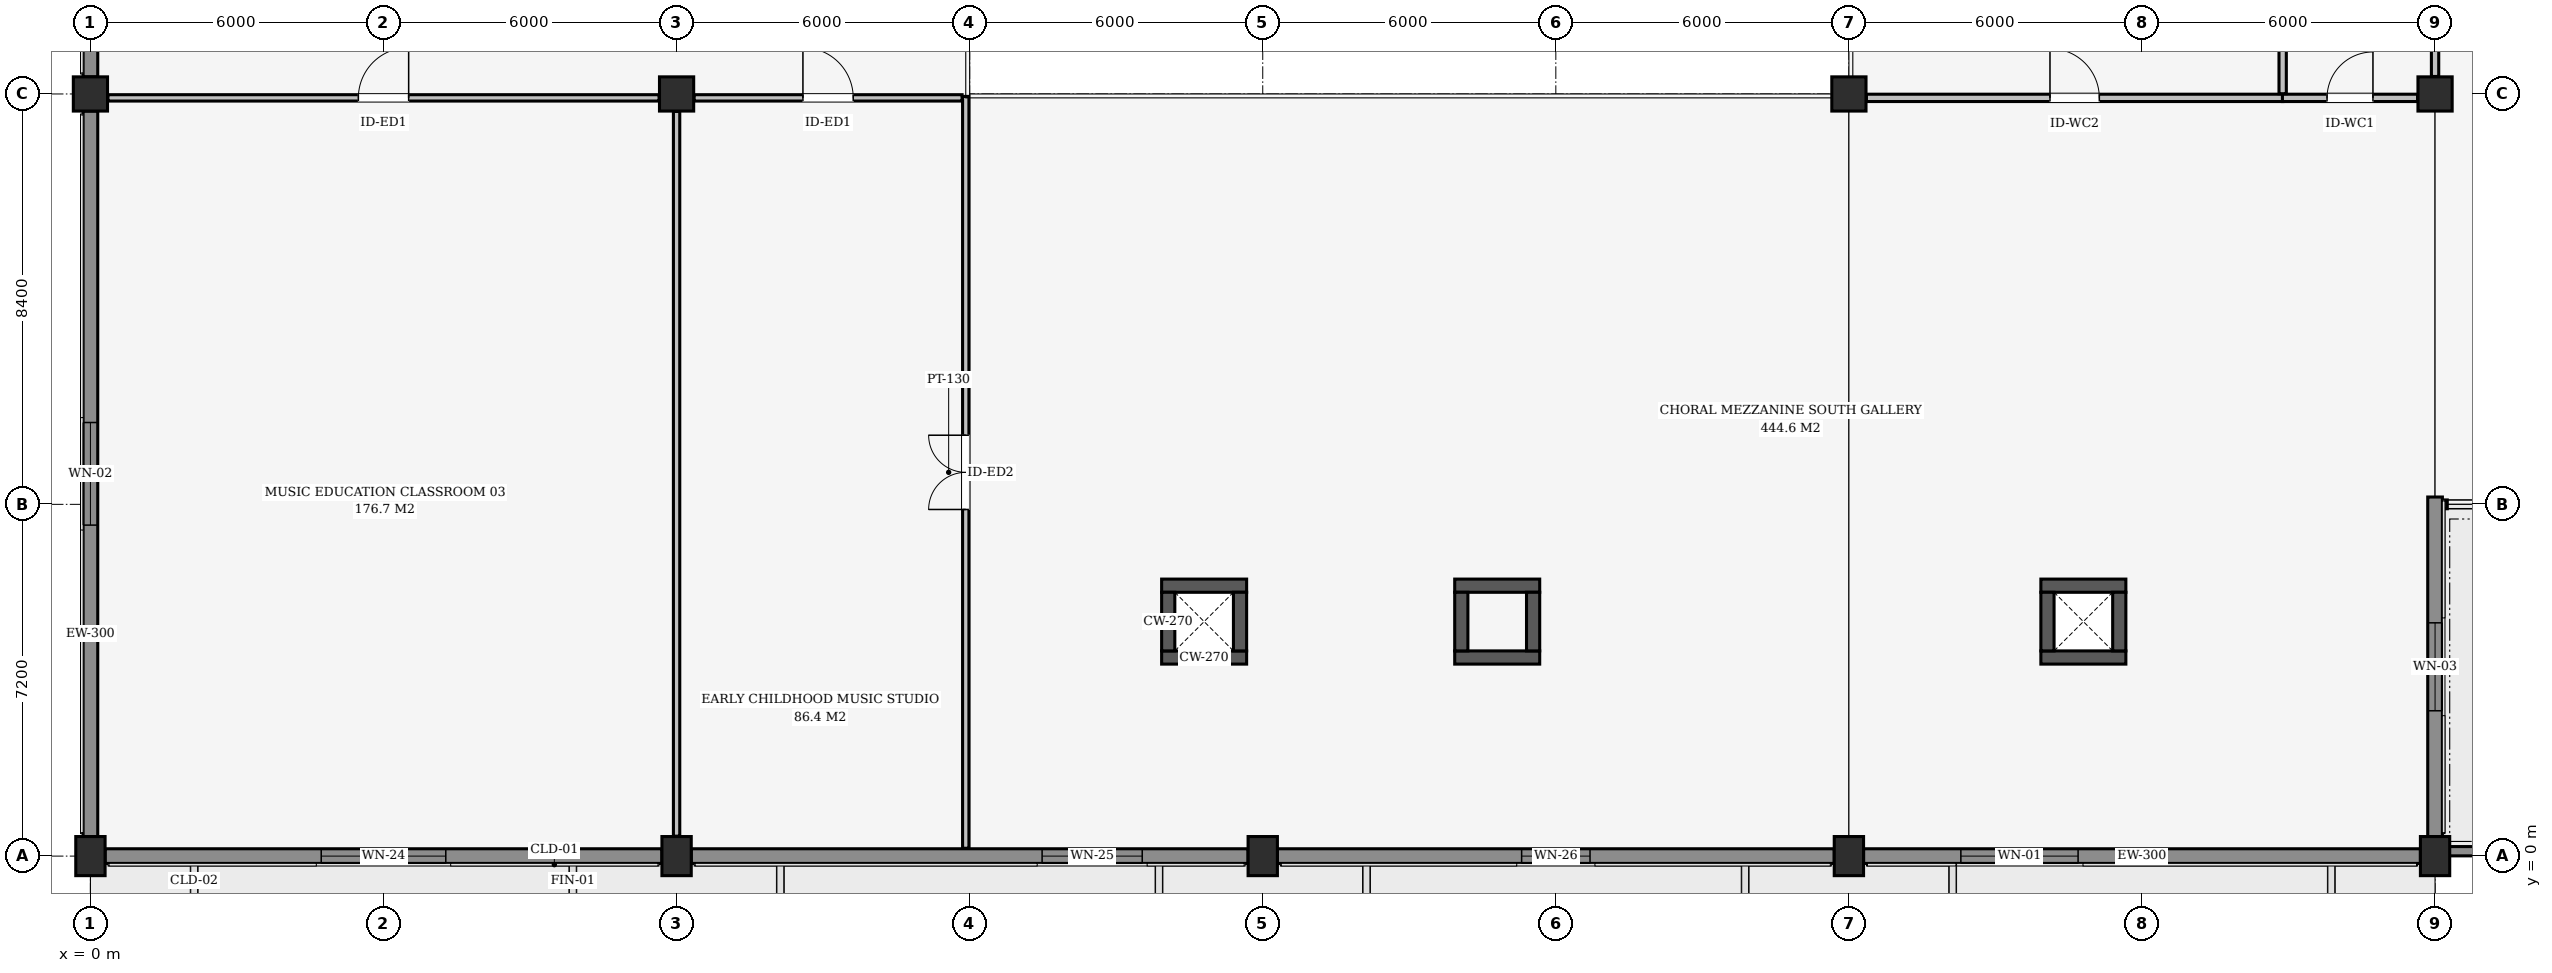
"""IFC4 building model, lengths in metres.
Left out: names, types, materials, properties, quantities, classifications, styles, units other than length and angle.
Written with IfcOpenShell. Run it as: python <this file> out.ifc"""

import sys

from ifc_helpers import new_model, si_unit, direction, frame, frame_2d, origin, origin_2d, place, context, subcontext, project, spatial, rectangle, extrude, element, fill, save


model = new_model("IFC4")
c1 = context("Model", 3, precision=1e-05, world=origin(), true_north=direction((0.0, 1.0)))
c2 = subcontext(c1, "Body", "Model", "MODEL_VIEW")
j1 = project(units=[si_unit("LENGTHUNIT", "METRE"), si_unit("PLANEANGLEUNIT", "RADIAN")], contexts=[c1])
p1 = place(None, origin())
s1 = spatial("IfcSite", under=j1, at=p1, CompositionType="ELEMENT")
p2 = place(p1, origin())
s2 = spatial("IfcBuilding", under=s1, at=p2, CompositionType="ELEMENT")
p3 = place(p2, frame((0.0, 0.0, 4.8)))
s3 = spatial("IfcBuildingStorey", under=s2, at=p3, CompositionType="ELEMENT", Elevation=4.8)
for number, where, z_axis, x_axis in (
    (1, (0.0, 0.0, 0.0), (0.0, 0.0, 1.0), (1.0, 0.0, 0.0)),
    (2, (12.0, 0.0, 0.0), (0.0, 0.0, 1.0), (1.0, 0.0, 0.0)),
    (3, (24.0, 0.0, 0.0), (0.0, 0.0, 1.0), (1.0, 0.0, 0.0)),
    (4, (36.0, 0.0, 0.0), (0.0, 0.0, 1.0), (1.0, 0.0, 0.0)),
    (5, (48.0, 0.0, 0.0), (0.0, 0.0, 1.0), (1.0, 0.0, 0.0)),
):
    element("IfcColumn", number, at=place(p3, frame(where, z_axis=z_axis, x_axis=x_axis)), inside=s3, PredefinedType="COLUMN", context=c2, shape_type="SweptSolid", body=[
        extrude(rectangle(XDim=0.6, YDim=0.8, at=origin_2d()), origin(), (0.0, 0.0, 1.0), 4.5),
    ])
for number, where, z_axis, x_axis in (
    (6, (0.0, 15.6, 0.0), (0.0, 0.0, 1.0), (1.0, 0.0, 0.0)),
    (7, (12.0, 15.6, 0.0), (0.0, 0.0, 1.0), (1.0, 0.0, 0.0)),
    (8, (36.0, 15.6, 0.0), (0.0, 0.0, 1.0), (1.0, 0.0, 0.0)),
    (9, (48.0, 15.6, 0.0), (0.0, 0.0, 1.0), (1.0, 0.0, 0.0)),
):
    element("IfcColumn", number, at=place(p3, frame(where, z_axis=z_axis, x_axis=x_axis)), inside=s3, PredefinedType="COLUMN", context=c2, shape_type="SweptSolid", body=[
        extrude(rectangle(XDim=0.7, YDim=0.7, at=origin_2d()), origin(), (0.0, 0.0, 1.0), 4.5),
    ])
p4 = place(p3, frame((11.7, 0.0, 0.0), z_axis=(0.0, 0.0, 1.0), x_axis=(-1.0, 0.0, 0.0)))
e10 = element("IfcWall", 10, at=p4, inside=s3, PredefinedType="SOLIDWALL", context=c2, shape_type="SweptSolid", body=[
    extrude(rectangle(XDim=11.4, YDim=0.3, at=frame_2d((5.7, 0.0))), origin(), (0.0, 0.0, 1.0), 3.623),
])
p5 = place(p4, frame((4.425, 0.0, 0.85)))
e11 = element("IfcOpeningElement", 11, at=p5, cuts=e10, PredefinedType="OPENING", context=c2, shape_type="SweptSolid", body=[
    extrude(rectangle(XDim=2.55, YDim=1.05, at=frame_2d((1.275, 0.525))), frame((0.0, 0.16, 0.0), z_axis=(0.0, -1.0, 0.0), x_axis=(1.0, 0.0, 0.0)), (0.0, 0.0, 1.0), 0.32),
])
p6 = place(p3, frame((23.7, 0.0, 0.0), z_axis=(0.0, 0.0, 1.0), x_axis=(-1.0, 0.0, 0.0)))
e12 = element("IfcWall", 12, at=p6, inside=s3, PredefinedType="SOLIDWALL", context=c2, shape_type="SweptSolid", body=[
    extrude(rectangle(XDim=11.4, YDim=0.3, at=frame_2d((5.7, 0.0))), origin(), (0.0, 0.0, 1.0), 3.623),
])
p7 = place(p6, frame((2.167, 0.0, 0.85)))
e13 = element("IfcOpeningElement", 13, at=p7, cuts=e12, PredefinedType="OPENING", context=c2, shape_type="SweptSolid", body=[
    extrude(rectangle(XDim=2.05, YDim=1.5, at=frame_2d((1.025, 0.75))), frame((0.0, 0.16, 0.0), z_axis=(0.0, -1.0, 0.0), x_axis=(1.0, 0.0, 0.0)), (0.0, 0.0, 1.0), 0.32),
])
p8 = place(p3, frame((35.7, 0.0, 0.0), z_axis=(0.0, 0.0, 1.0), x_axis=(-1.0, 0.0, 0.0)))
e14 = element("IfcWall", 14, at=p8, inside=s3, PredefinedType="SOLIDWALL", context=c2, shape_type="SweptSolid", body=[
    extrude(rectangle(XDim=11.4, YDim=0.3, at=frame_2d((5.7, 0.0))), origin(), (0.0, 0.0, 1.0), 3.623),
])
p9 = place(p8, frame((5.0, 0.0, 0.85)))
e15 = element("IfcOpeningElement", 15, at=p9, cuts=e14, PredefinedType="OPENING", context=c2, shape_type="SweptSolid", body=[
    extrude(rectangle(XDim=1.4, YDim=1.3, at=frame_2d((0.7, 0.65))), frame((0.0, 0.16, 0.0), z_axis=(0.0, -1.0, 0.0), x_axis=(1.0, 0.0, 0.0)), (0.0, 0.0, 1.0), 0.32),
])
p10 = place(p3, frame((47.7, 0.0, 0.0), z_axis=(0.0, 0.0, 1.0), x_axis=(-1.0, 0.0, 0.0)))
e16 = element("IfcWall", 16, at=p10, inside=s3, PredefinedType="SOLIDWALL", context=c2, shape_type="SweptSolid", body=[
    extrude(rectangle(XDim=11.4, YDim=0.3, at=frame_2d((5.7, 0.0))), origin(), (0.0, 0.0, 1.0), 3.623),
])
p11 = place(p10, frame((7.008, 0.0, 0.85)))
e17 = element("IfcOpeningElement", 17, at=p11, cuts=e16, PredefinedType="OPENING", context=c2, shape_type="SweptSolid", body=[
    extrude(rectangle(XDim=2.4, YDim=1.8, at=frame_2d((1.2, 0.9))), frame((0.0, 0.16, 0.0), z_axis=(0.0, -1.0, 0.0), x_axis=(1.0, 0.0, 0.0)), (0.0, 0.0, 1.0), 0.32),
])
p12 = place(p3, frame((0.0, 0.4, 0.0), z_axis=(0.0, 0.0, 1.0), x_axis=(0.0, 1.0, 0.0)))
e18 = element("IfcWall", 18, at=p12, inside=s3, PredefinedType="SOLIDWALL", context=c2, shape_type="SweptSolid", body=[
    extrude(rectangle(XDim=14.85, YDim=0.3, at=frame_2d((7.425, 0.0))), origin(), (0.0, 0.0, 1.0), 3.384),
])
p13 = place(p12, frame((6.375, 0.0, 0.85)))
e19 = element("IfcOpeningElement", 19, at=p13, cuts=e18, PredefinedType="OPENING", context=c2, shape_type="SweptSolid", body=[
    extrude(rectangle(XDim=2.1, YDim=1.8, at=frame_2d((1.05, 0.9))), frame((0.0, 0.16, 0.0), z_axis=(0.0, -1.0, 0.0), x_axis=(1.0, 0.0, 0.0)), (0.0, 0.0, 1.0), 0.32),
])
p14 = place(p3, frame((48.0, 7.35, 0.0), z_axis=(0.0, 0.0, 1.0), x_axis=(0.0, -1.0, 0.0)))
e20 = element("IfcWall", 20, at=p14, inside=s3, PredefinedType="SOLIDWALL", context=c2, shape_type="SweptSolid", body=[
    extrude(rectangle(XDim=6.95, YDim=0.3, at=frame_2d((3.475, 0.0))), origin(), (0.0, 0.0, 1.0), 3.384),
])
p15 = place(p14, frame((2.575, 0.0, 0.85)))
e21 = element("IfcOpeningElement", 21, at=p15, cuts=e20, PredefinedType="OPENING", context=c2, shape_type="SweptSolid", body=[
    extrude(rectangle(XDim=1.8, YDim=1.65, at=frame_2d((0.9, 0.825))), frame((0.0, 0.16, 0.0), z_axis=(0.0, -1.0, 0.0), x_axis=(1.0, 0.0, 0.0)), (0.0, 0.0, 1.0), 0.32),
])
p16 = place(p3, frame((0.0, 15.95, 0.0), z_axis=(0.0, 0.0, 1.0), x_axis=(0.0, 1.0, 0.0)))
e22 = element("IfcWall", 22, at=p16, inside=s3, PredefinedType="SOLIDWALL", context=c2, shape_type="SweptSolid", body=[
    extrude(rectangle(XDim=13.7, YDim=0.3, at=frame_2d((6.85, 0.0))), origin(), (0.0, 0.0, 1.0), 3.619),
])
p17 = place(p16, frame((6.1, 0.0, 0.85)))
e23 = element("IfcOpeningElement", 23, at=p17, cuts=e22, PredefinedType="OPENING", context=c2, shape_type="SweptSolid", body=[
    extrude(rectangle(XDim=1.5, YDim=1.65, at=frame_2d((0.75, 0.825))), frame((0.0, 0.16, 0.0), z_axis=(0.0, -1.0, 0.0), x_axis=(1.0, 0.0, 0.0)), (0.0, 0.0, 1.0), 0.32),
])
p18 = place(p3, frame((48.1, 0.1, 0.06), z_axis=(0.0, 0.0, 1.0), x_axis=(1.0, 0.0, 0.0)))
e24 = element("IfcWall", 24, at=p18, inside=s3, PredefinedType="PARAPET", context=c2, shape_type="SweptSolid", body=[
    extrude(rectangle(XDim=35.9, YDim=0.19, at=frame_2d((17.95, 0.0))), origin(), (0.0, 0.0, 1.0), 0.56),
])
for number, where, z_axis, x_axis in (
    (25, (21.93, 4.065, 0.0), (0.0, 0.0, 1.0), (1.0, 0.0, 0.0)),
    (26, (21.93, 5.535, 0.0), (0.0, 0.0, 1.0), (1.0, 0.0, 0.0)),
):
    element("IfcWall", number, at=place(p3, frame(where, z_axis=z_axis, x_axis=x_axis)), inside=s3, PredefinedType="SHEAR", context=c2, shape_type="SweptSolid", body=[
        extrude(rectangle(XDim=1.74, YDim=0.27, at=frame_2d((0.87, 0.0))), origin(), (0.0, 0.0, 1.0), 4.25),
    ])
for number, where, z_axis, x_axis in (
    (27, (22.065, 4.2, 0.0), (0.0, 0.0, 1.0), (0.0, 1.0, 0.0)),
    (28, (23.535, 4.2, 0.0), (0.0, 0.0, 1.0), (0.0, 1.0, 0.0)),
):
    element("IfcWall", number, at=place(p3, frame(where, z_axis=z_axis, x_axis=x_axis)), inside=s3, PredefinedType="SHEAR", context=c2, shape_type="SweptSolid", body=[
        extrude(rectangle(XDim=1.2, YDim=0.27, at=frame_2d((0.6, 0.0))), origin(), (0.0, 0.0, 1.0), 4.25),
    ])
for number, where, z_axis, x_axis in (
    (29, (39.93, 4.065, 0.0), (0.0, 0.0, 1.0), (1.0, 0.0, 0.0)),
    (30, (39.93, 5.535, 0.0), (0.0, 0.0, 1.0), (1.0, 0.0, 0.0)),
):
    element("IfcWall", number, at=place(p3, frame(where, z_axis=z_axis, x_axis=x_axis)), inside=s3, PredefinedType="SHEAR", context=c2, shape_type="SweptSolid", body=[
        extrude(rectangle(XDim=1.74, YDim=0.27, at=frame_2d((0.87, 0.0))), origin(), (0.0, 0.0, 1.0), 4.25),
    ])
for number, where, z_axis, x_axis in (
    (31, (40.065, 4.2, 0.0), (0.0, 0.0, 1.0), (0.0, 1.0, 0.0)),
    (32, (41.535, 4.2, 0.0), (0.0, 0.0, 1.0), (0.0, 1.0, 0.0)),
):
    element("IfcWall", number, at=place(p3, frame(where, z_axis=z_axis, x_axis=x_axis)), inside=s3, PredefinedType="SHEAR", context=c2, shape_type="SweptSolid", body=[
        extrude(rectangle(XDim=1.2, YDim=0.27, at=frame_2d((0.6, 0.0))), origin(), (0.0, 0.0, 1.0), 4.25),
    ])
for number, where, z_axis, x_axis in (
    (33, (27.93, 4.065, 0.0), (0.0, 0.0, 1.0), (1.0, 0.0, 0.0)),
    (34, (27.93, 5.535, 0.0), (0.0, 0.0, 1.0), (1.0, 0.0, 0.0)),
):
    element("IfcWall", number, at=place(p3, frame(where, z_axis=z_axis, x_axis=x_axis)), inside=s3, PredefinedType="SHEAR", context=c2, shape_type="SweptSolid", body=[
        extrude(rectangle(XDim=1.74, YDim=0.27, at=frame_2d((0.87, 0.0))), origin(), (0.0, 0.0, 1.0), 4.25),
    ])
for number, where, z_axis, x_axis in (
    (35, (28.065, 4.2, 0.0), (0.0, 0.0, 1.0), (0.0, 1.0, 0.0)),
    (36, (29.535, 4.2, 0.0), (0.0, 0.0, 1.0), (0.0, 1.0, 0.0)),
):
    element("IfcWall", number, at=place(p3, frame(where, z_axis=z_axis, x_axis=x_axis)), inside=s3, PredefinedType="SHEAR", context=c2, shape_type="SweptSolid", body=[
        extrude(rectangle(XDim=1.2, YDim=0.27, at=frame_2d((0.6, 0.0))), origin(), (0.0, 0.0, 1.0), 4.25),
    ])
p19 = place(p3, frame((17.92, 0.16, 0.0), z_axis=(0.0, 0.0, 1.0), x_axis=(0.0, 1.0, 0.0)))
e37 = element("IfcWall", 37, at=p19, inside=s3, PredefinedType="PARTITIONING", context=c2, shape_type="SweptSolid", body=[
    extrude(rectangle(XDim=15.39, YDim=0.13, at=frame_2d((7.695, 0.0))), origin(), (0.0, 0.0, 1.0), 3.686),
])
p20 = place(p19, frame((6.935, 0.0, 0.0)))
e38 = element("IfcOpeningElement", 38, at=p20, cuts=e37, PredefinedType="OPENING", context=c2, shape_type="SweptSolid", body=[
    extrude(rectangle(XDim=1.52, YDim=2.24, at=frame_2d((0.76, 1.12))), frame((0.0, 0.075, 0.0), z_axis=(0.0, -1.0, 0.0), x_axis=(1.0, 0.0, 0.0)), (0.0, 0.0, 1.0), 0.15),
])
p21 = place(p3, frame((36.358, 15.52, 0.0), z_axis=(0.0, 0.0, 1.0), x_axis=(1.0, 0.0, 0.0)))
e39 = element("IfcWall", 39, at=p21, inside=s3, PredefinedType="PARTITIONING", context=c2, shape_type="SweptSolid", body=[
    extrude(rectangle(XDim=8.527, YDim=0.15, at=frame_2d((4.264, 0.0))), origin(), (0.0, 0.0, 1.0), 3.623),
])
p22 = place(p21, frame((3.759, 0.0, 0.0)))
e40 = element("IfcOpeningElement", 40, at=p22, cuts=e39, PredefinedType="OPENING", context=c2, shape_type="SweptSolid", body=[
    extrude(rectangle(XDim=1.01, YDim=2.1, at=frame_2d((0.505, 1.05))), frame((0.0, 0.085, 0.0), z_axis=(0.0, -1.0, 0.0), x_axis=(1.0, 0.0, 0.0)), (0.0, 0.0, 1.0), 0.17),
])
p23 = place(p3, frame((44.875, 15.52, 0.0), z_axis=(0.0, 0.0, 1.0), x_axis=(1.0, 0.0, 0.0)))
e41 = element("IfcWall", 41, at=p23, inside=s3, PredefinedType="PARTITIONING", context=c2, shape_type="SweptSolid", body=[
    extrude(rectangle(XDim=2.767, YDim=0.15, at=frame_2d((1.384, 0.0))), origin(), (0.0, 0.0, 1.0), 3.623),
])
p24 = place(p23, frame((0.914, 0.0, 0.0)))
e42 = element("IfcOpeningElement", 42, at=p24, cuts=e41, PredefinedType="OPENING", context=c2, shape_type="SweptSolid", body=[
    extrude(rectangle(XDim=0.94, YDim=2.1, at=frame_2d((0.47, 1.05))), frame((0.0, 0.085, 0.0), z_axis=(0.0, -1.0, 0.0), x_axis=(1.0, 0.0, 0.0)), (0.0, 0.0, 1.0), 0.17),
])
p25 = place(p3, frame((0.358, 15.52, 0.0), z_axis=(0.0, 0.0, 1.0), x_axis=(1.0, 0.0, 0.0)))
e43 = element("IfcWall", 43, at=p25, inside=s3, PredefinedType="PARTITIONING", context=c2, shape_type="SweptSolid", body=[
    extrude(rectangle(XDim=11.284, YDim=0.13, at=frame_2d((5.642, 0.0))), origin(), (0.0, 0.0, 1.0), 3.623),
])
p26 = place(p25, frame((5.127, 0.0, 0.0)))
e44 = element("IfcOpeningElement", 44, at=p26, cuts=e43, PredefinedType="OPENING", context=c2, shape_type="SweptSolid", body=[
    extrude(rectangle(XDim=1.03, YDim=2.18, at=frame_2d((0.515, 1.09))), frame((0.0, 0.075, 0.0), z_axis=(0.0, -1.0, 0.0), x_axis=(1.0, 0.0, 0.0)), (0.0, 0.0, 1.0), 0.15),
])
p27 = place(p3, frame((12.358, 15.52, 0.0), z_axis=(0.0, 0.0, 1.0), x_axis=(1.0, 0.0, 0.0)))
e45 = element("IfcWall", 45, at=p27, inside=s3, PredefinedType="PARTITIONING", context=c2, shape_type="SweptSolid", body=[
    extrude(rectangle(XDim=5.487, YDim=0.13, at=frame_2d((2.744, 0.0))), origin(), (0.0, 0.0, 1.0), 2.93),
])
p28 = place(p27, frame((2.229, 0.0, 0.0)))
e46 = element("IfcOpeningElement", 46, at=p28, cuts=e45, PredefinedType="OPENING", context=c2, shape_type="SweptSolid", body=[
    extrude(rectangle(XDim=1.03, YDim=2.18, at=frame_2d((0.515, 1.09))), frame((0.0, 0.075, 0.0), z_axis=(0.0, -1.0, 0.0), x_axis=(1.0, 0.0, 0.0)), (0.0, 0.0, 1.0), 0.15),
])
p29 = place(p3, frame((12.0, 0.408, 0.0), z_axis=(0.0, 0.0, 1.0), x_axis=(0.0, 1.0, 0.0)))
e47 = element("IfcWall", 47, at=p29, inside=s3, PredefinedType="PARTITIONING", context=c2, shape_type="SweptSolid", body=[
    extrude(rectangle(XDim=14.834, YDim=0.13, at=frame_2d((7.417, 0.0))), origin(), (0.0, 0.0, 1.0), 3.384),
])
p30 = place(p3, frame((44.88, 15.605, 0.0), z_axis=(0.0, 0.0, 1.0), x_axis=(0.0, 1.0, 0.0)))
e48 = element("IfcWall", 48, at=p30, inside=s3, PredefinedType="PARTITIONING", context=c2, shape_type="SweptSolid", body=[
    extrude(rectangle(XDim=8.43, YDim=0.15, at=frame_2d((4.215, 0.0))), origin(), (0.0, 0.0, 1.0), 3.768),
])
p31 = place(p3, frame((48.0, 15.958, 0.0), z_axis=(0.0, 0.0, 1.0), x_axis=(0.0, 1.0, 0.0)))
e49 = element("IfcWall", 49, at=p31, inside=s3, PredefinedType="PARTITIONING", context=c2, shape_type="SweptSolid", body=[
    extrude(rectangle(XDim=8.077, YDim=0.15, at=frame_2d((4.039, 0.0))), origin(), (0.0, 0.0, 1.0), 3.619),
])
p32 = place(p31, frame((3.569, 0.0, 0.0)))
e50 = element("IfcOpeningElement", 50, at=p32, cuts=e49, PredefinedType="OPENING", context=c2, shape_type="SweptSolid", body=[
    extrude(rectangle(XDim=0.94, YDim=2.1, at=frame_2d((0.47, 1.05))), frame((0.0, 0.085, 0.0), z_axis=(0.0, -1.0, 0.0), x_axis=(1.0, 0.0, 0.0)), (0.0, 0.0, 1.0), 0.17),
])
p33 = place(p5, origin())
e51 = element("IfcWindow", 51, at=p33, inside=s3, PartitioningType="SINGLE_PANEL", PredefinedType="WINDOW", context=c2, shape_type="SweptSolid", body=[
    extrude(rectangle(XDim=2.55, YDim=1.05, at=frame_2d((1.275, 0.525))), frame((0.0, 0.03, 0.0), z_axis=(0.0, -1.0, 0.0), x_axis=(1.0, 0.0, 0.0)), (0.0, 0.0, 1.0), 0.06),
])
fill(e11, e51)
p34 = place(p7, origin())
e52 = element("IfcWindow", 52, at=p34, inside=s3, PartitioningType="SINGLE_PANEL", PredefinedType="WINDOW", context=c2, shape_type="SweptSolid", body=[
    extrude(rectangle(XDim=2.05, YDim=1.5, at=frame_2d((1.025, 0.75))), frame((0.0, 0.03, 0.0), z_axis=(0.0, -1.0, 0.0), x_axis=(1.0, 0.0, 0.0)), (0.0, 0.0, 1.0), 0.06),
])
fill(e13, e52)
p35 = place(p9, origin())
e53 = element("IfcWindow", 53, at=p35, inside=s3, PartitioningType="SINGLE_PANEL", PredefinedType="WINDOW", context=c2, shape_type="SweptSolid", body=[
    extrude(rectangle(XDim=1.4, YDim=1.3, at=frame_2d((0.7, 0.65))), frame((0.0, 0.03, 0.0), z_axis=(0.0, -1.0, 0.0), x_axis=(1.0, 0.0, 0.0)), (0.0, 0.0, 1.0), 0.06),
])
fill(e15, e53)
p36 = place(p11, origin())
e54 = element("IfcWindow", 54, at=p36, inside=s3, PartitioningType="SINGLE_PANEL", PredefinedType="WINDOW", context=c2, shape_type="SweptSolid", body=[
    extrude(rectangle(XDim=2.4, YDim=1.8, at=frame_2d((1.2, 0.9))), frame((0.0, 0.03, 0.0), z_axis=(0.0, -1.0, 0.0), x_axis=(1.0, 0.0, 0.0)), (0.0, 0.0, 1.0), 0.06),
])
fill(e17, e54)
p37 = place(p13, origin())
e55 = element("IfcWindow", 55, at=p37, inside=s3, PartitioningType="SINGLE_PANEL", PredefinedType="WINDOW", context=c2, shape_type="SweptSolid", body=[
    extrude(rectangle(XDim=2.1, YDim=1.8, at=frame_2d((1.05, 0.9))), frame((0.0, 0.03, 0.0), z_axis=(0.0, -1.0, 0.0), x_axis=(1.0, 0.0, 0.0)), (0.0, 0.0, 1.0), 0.06),
])
fill(e19, e55)
p38 = place(p15, origin())
e56 = element("IfcWindow", 56, at=p38, inside=s3, PartitioningType="SINGLE_PANEL", PredefinedType="WINDOW", context=c2, shape_type="SweptSolid", body=[
    extrude(rectangle(XDim=1.8, YDim=1.65, at=frame_2d((0.9, 0.825))), frame((0.0, 0.03, 0.0), z_axis=(0.0, -1.0, 0.0), x_axis=(1.0, 0.0, 0.0)), (0.0, 0.0, 1.0), 0.06),
])
fill(e21, e56)
p39 = place(p20, origin())
e57 = element("IfcDoor", 57, at=p39, inside=s3, OperationType="DOUBLE_DOOR_SINGLE_SWING", PredefinedType="DOOR", context=c2, shape_type="SweptSolid", body=[
    extrude(rectangle(XDim=1.52, YDim=2.24, at=frame_2d((0.76, 1.12))), frame((0.0, 0.025, 0.0), z_axis=(0.0, -1.0, 0.0), x_axis=(1.0, 0.0, 0.0)), (0.0, 0.0, 1.0), 0.05),
])
fill(e38, e57)
p40 = place(p22, origin())
e58 = element("IfcDoor", 58, at=p40, inside=s3, OperationType="SINGLE_SWING_LEFT", PredefinedType="DOOR", context=c2, shape_type="SweptSolid", body=[
    extrude(rectangle(XDim=1.01, YDim=2.1, at=frame_2d((0.505, 1.05))), frame((0.0, 0.025, 0.0), z_axis=(0.0, -1.0, 0.0), x_axis=(1.0, 0.0, 0.0)), (0.0, 0.0, 1.0), 0.05),
])
fill(e40, e58)
p41 = place(p24, origin())
e59 = element("IfcDoor", 59, at=p41, inside=s3, OperationType="SINGLE_SWING_RIGHT", PredefinedType="DOOR", context=c2, shape_type="SweptSolid", body=[
    extrude(rectangle(XDim=0.94, YDim=2.1, at=frame_2d((0.47, 1.05))), frame((0.0, 0.025, 0.0), z_axis=(0.0, -1.0, 0.0), x_axis=(1.0, 0.0, 0.0)), (0.0, 0.0, 1.0), 0.05),
])
fill(e42, e59)
p42 = place(p26, origin())
e60 = element("IfcDoor", 60, at=p42, inside=s3, OperationType="SINGLE_SWING_RIGHT", PredefinedType="DOOR", context=c2, shape_type="SweptSolid", body=[
    extrude(rectangle(XDim=1.03, YDim=2.18, at=frame_2d((0.515, 1.09))), frame((0.0, 0.025, 0.0), z_axis=(0.0, -1.0, 0.0), x_axis=(1.0, 0.0, 0.0)), (0.0, 0.0, 1.0), 0.05),
])
fill(e44, e60)
p43 = place(p28, origin())
e61 = element("IfcDoor", 61, at=p43, inside=s3, OperationType="SINGLE_SWING_LEFT", PredefinedType="DOOR", context=c2, shape_type="SweptSolid", body=[
    extrude(rectangle(XDim=1.03, YDim=2.18, at=frame_2d((0.515, 1.09))), frame((0.0, 0.025, 0.0), z_axis=(0.0, -1.0, 0.0), x_axis=(1.0, 0.0, 0.0)), (0.0, 0.0, 1.0), 0.05),
])
fill(e46, e61)
save(model, sys.argv[1])
